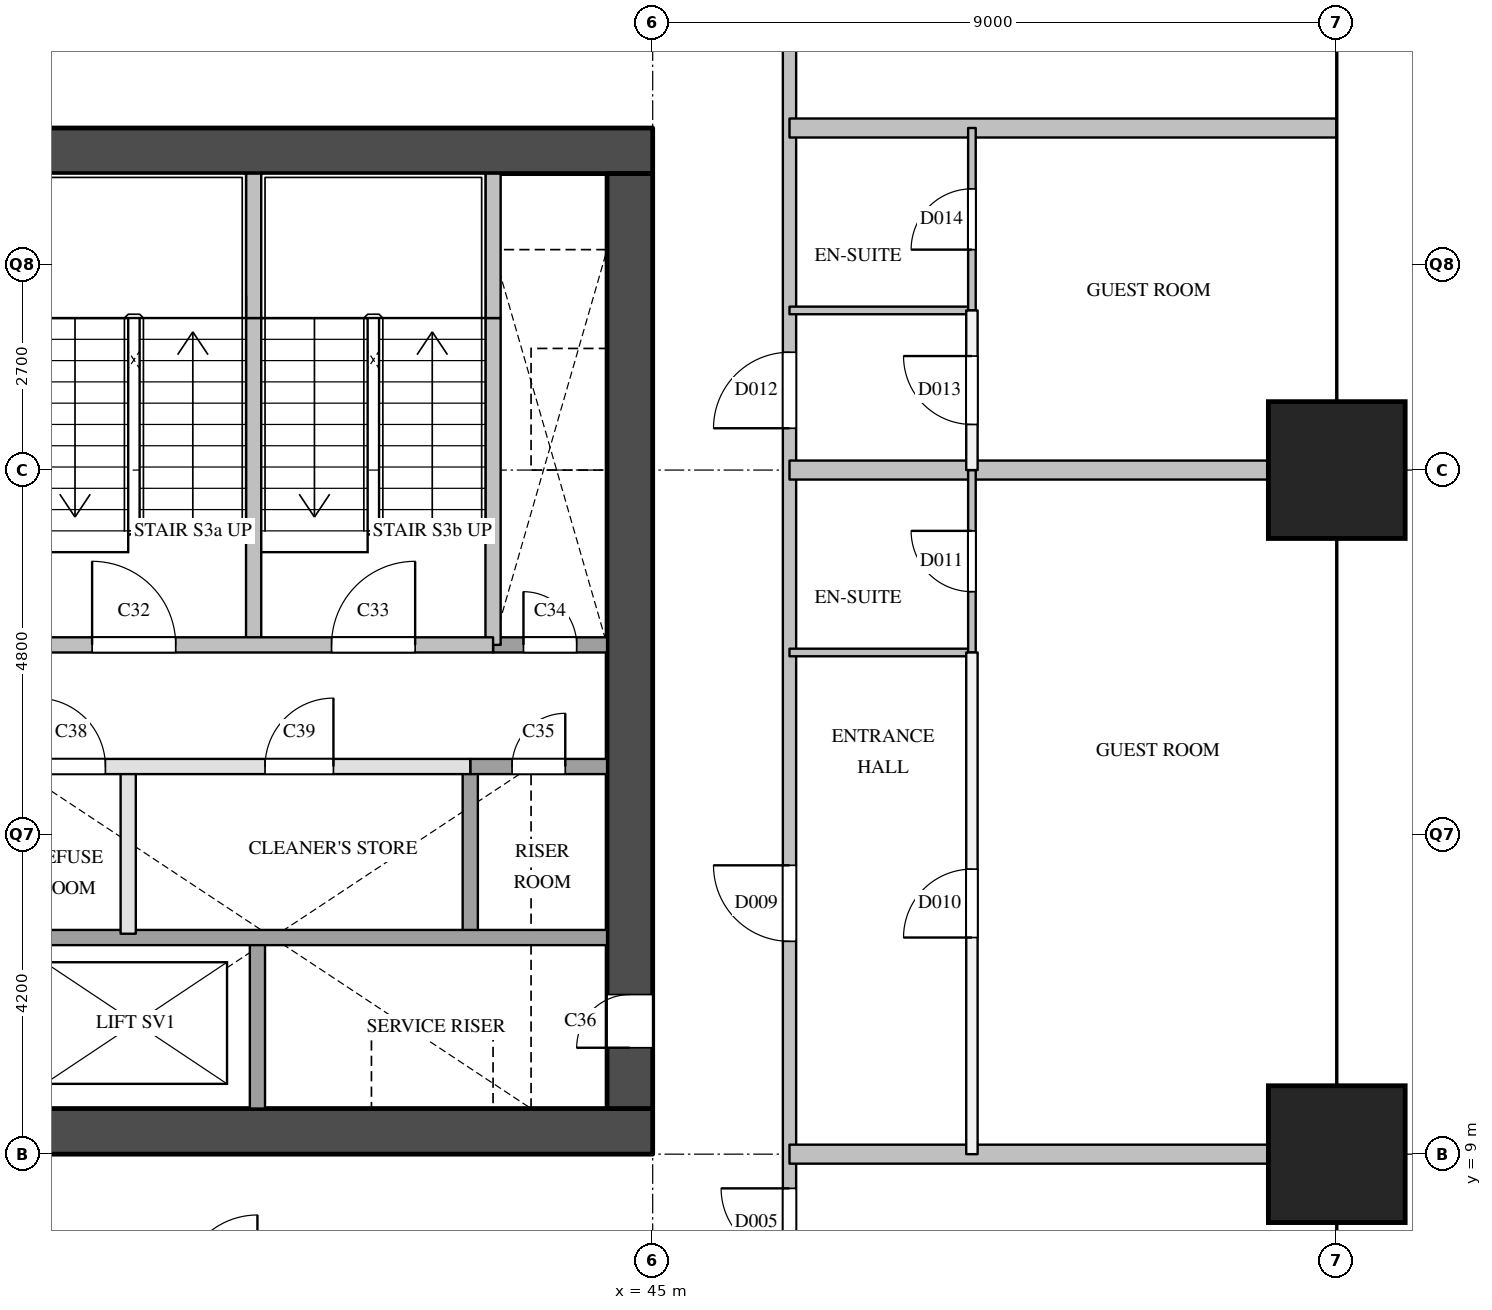
"""IFC4 building model, lengths in metres.
Left out: names, types, materials, properties, quantities, classifications, styles, units other than length and angle.
Written with IfcOpenShell. Run it as: python <this file> out.ifc"""

import sys

from ifc_helpers import new_model, si_unit, direction, frame, frame_2d, origin, origin_2d, place, context, subcontext, project, spatial, rectangle, extrude, element, fill, save


model = new_model("IFC4")
c1 = context("Model", 3, precision=1e-05, world=origin(), true_north=direction((0.0, 1.0)))
c2 = subcontext(c1, "Body", "Model", "MODEL_VIEW")
j1 = project(units=[si_unit("LENGTHUNIT", "METRE"), si_unit("PLANEANGLEUNIT", "RADIAN")], contexts=[c1])
p1 = place(None, origin())
s1 = spatial("IfcSite", under=j1, at=p1, CompositionType="ELEMENT")
p2 = place(p1, origin())
s2 = spatial("IfcBuilding", under=s1, at=p2, CompositionType="ELEMENT")
p3 = place(p2, frame((0.0, 0.0, 96.8)))
s3 = spatial("IfcBuildingStorey", under=s2, at=p3, CompositionType="ELEMENT", Elevation=96.8)
for number, where, z_axis, x_axis in (
    (1, (54.0, 9.0, 0.0), (0.0, 0.0, 1.0), (1.0, 0.0, 0.0)),
    (2, (54.0, 18.0, 0.0), (0.0, 0.0, 1.0), (1.0, 0.0, 0.0)),
):
    element("IfcColumn", number, at=place(p3, frame(where, z_axis=z_axis, x_axis=x_axis)), inside=s3, PredefinedType="COLUMN", context=c2, shape_type="SweptSolid", body=[
        extrude(rectangle(XDim=1.8, YDim=1.8, at=origin_2d()), origin(), (0.0, 0.0, 1.0), 3.8),
    ])
for number, where, z_axis, x_axis in (
    (3, (36.0, 9.3, 0.0), (0.0, 0.0, 1.0), (1.0, 0.0, 0.0)),
    (4, (36.0, 22.2, 0.0), (0.0, 0.0, 1.0), (1.0, 0.0, 0.0)),
):
    element("IfcWall", number, at=place(p3, frame(where, z_axis=z_axis, x_axis=x_axis)), inside=s3, PredefinedType="SHEAR", context=c2, shape_type="SweptSolid", body=[
        extrude(rectangle(XDim=9.0, YDim=0.6, at=frame_2d((4.5, 0.0))), origin(), (0.0, 0.0, 1.0), 3.5),
    ])
p4 = place(p3, frame((44.7, 9.6, 0.0), z_axis=(0.0, 0.0, 1.0), x_axis=(0.0, 1.0, 0.0)))
e5 = element("IfcWall", 5, at=p4, inside=s3, PredefinedType="SHEAR", context=c2, shape_type="SweptSolid", body=[
    extrude(rectangle(XDim=12.3, YDim=0.6, at=frame_2d((6.15, 0.0))), origin(), (0.0, 0.0, 1.0), 3.5),
])
p5 = place(p4, frame((0.8, 0.0, 0.0)))
e6 = element("IfcOpeningElement", 6, at=p5, cuts=e5, PredefinedType="OPENING", context=c2, shape_type="SweptSolid", body=[
    extrude(rectangle(XDim=0.7, YDim=2.1, at=frame_2d((0.35, 1.05))), frame((0.0, 0.31, 0.0), z_axis=(0.0, -1.0, 0.0), x_axis=(1.0, 0.0, 0.0)), (0.0, 0.0, 1.0), 0.62),
])
p6 = place(p3, frame((38.1, 11.9, 0.0), z_axis=(0.0, 0.0, 1.0), x_axis=(0.0, 1.0, 0.0)))
e7 = element("IfcWall", 7, at=p6, inside=s3, PredefinedType="PARTITIONING", context=c2, shape_type="SweptSolid", body=[
    extrude(rectangle(XDim=2.2, YDim=0.2, at=frame_2d((1.1, 0.0))), origin(), (0.0, 0.0, 1.0), 3.5),
])
p7 = place(p3, frame((39.75, 15.7, 0.0), z_axis=(0.0, 0.0, 1.0), x_axis=(0.0, 1.0, 0.0)))
e8 = element("IfcWall", 8, at=p7, inside=s3, PredefinedType="SOLIDWALL", context=c2, shape_type="SweptSolid", body=[
    extrude(rectangle(XDim=4.3, YDim=0.2, at=frame_2d((2.15, 0.0))), origin(), (0.0, 0.0, 1.0), 3.5),
])
p8 = place(p3, frame((39.75, 20.0, 0.0), z_axis=(0.0, 0.0, 1.0), x_axis=(0.0, 1.0, 0.0)))
e9 = element("IfcWall", 9, at=p8, inside=s3, PredefinedType="SOLIDWALL", context=c2, shape_type="SweptSolid", body=[
    extrude(rectangle(XDim=1.9, YDim=0.2, at=frame_2d((0.95, 0.0))), origin(), (0.0, 0.0, 1.0), 3.5),
])
p9 = place(p3, frame((39.8, 9.6, 0.0), z_axis=(0.0, 0.0, 1.0), x_axis=(0.0, 1.0, 0.0)))
e10 = element("IfcWall", 10, at=p9, inside=s3, PredefinedType="SOLIDWALL", context=c2, shape_type="SweptSolid", body=[
    extrude(rectangle(XDim=2.3, YDim=0.2, at=frame_2d((1.15, 0.0))), origin(), (0.0, 0.0, 1.0), 3.5),
])
p10 = place(p3, frame((42.6, 11.9, 0.0), z_axis=(0.0, 0.0, 1.0), x_axis=(0.0, 1.0, 0.0)))
e11 = element("IfcWall", 11, at=p10, inside=s3, PredefinedType="SOLIDWALL", context=c2, shape_type="SweptSolid", body=[
    extrude(rectangle(XDim=2.2, YDim=0.2, at=frame_2d((1.1, 0.0))), origin(), (0.0, 0.0, 1.0), 3.5),
])
p11 = place(p3, frame((42.9, 15.7, 0.0), z_axis=(0.0, 0.0, 1.0), x_axis=(0.0, 1.0, 0.0)))
e12 = element("IfcWall", 12, at=p11, inside=s3, PredefinedType="SOLIDWALL", context=c2, shape_type="SweptSolid", body=[
    extrude(rectangle(XDim=4.3, YDim=0.2, at=frame_2d((2.15, 0.0))), origin(), (0.0, 0.0, 1.0), 3.5),
])
p12 = place(p3, frame((42.9, 20.0, 0.0), z_axis=(0.0, 0.0, 1.0), x_axis=(0.0, 1.0, 0.0)))
e13 = element("IfcWall", 13, at=p12, inside=s3, PredefinedType="SOLIDWALL", context=c2, shape_type="SweptSolid", body=[
    extrude(rectangle(XDim=1.9, YDim=0.2, at=frame_2d((0.95, 0.0))), origin(), (0.0, 0.0, 1.0), 3.5),
])
p13 = place(p3, frame((36.6, 11.85, 0.0), z_axis=(0.0, 0.0, 1.0), x_axis=(1.0, 0.0, 0.0)))
e14 = element("IfcWall", 14, at=p13, inside=s3, PredefinedType="SOLIDWALL", context=c2, shape_type="SweptSolid", body=[
    extrude(rectangle(XDim=7.8, YDim=0.2, at=frame_2d((3.9, 0.0))), origin(), (0.0, 0.0, 1.0), 3.5),
])
p14 = place(p3, frame((36.6, 14.1, 0.0), z_axis=(0.0, 0.0, 1.0), x_axis=(1.0, 0.0, 0.0)))
e15 = element("IfcWall", 15, at=p14, inside=s3, PredefinedType="PARTITIONING", context=c2, shape_type="SweptSolid", body=[
    extrude(rectangle(XDim=6.0, YDim=0.2, at=frame_2d((3.0, 0.0))), origin(), (0.0, 0.0, 1.0), 3.5),
])
p15 = place(p14, frame((0.3, 0.0, 0.0)))
e16 = element("IfcOpeningElement", 16, at=p15, cuts=e15, PredefinedType="OPENING", context=c2, shape_type="SweptSolid", body=[
    extrude(rectangle(XDim=0.9, YDim=2.1, at=frame_2d((0.45, 1.05))), frame((0.0, 0.11, 0.0), z_axis=(0.0, -1.0, 0.0), x_axis=(1.0, 0.0, 0.0)), (0.0, 0.0, 1.0), 0.22),
])
p16 = place(p14, frame((3.3, 0.0, 0.0)))
e17 = element("IfcOpeningElement", 17, at=p16, cuts=e15, PredefinedType="OPENING", context=c2, shape_type="SweptSolid", body=[
    extrude(rectangle(XDim=0.9, YDim=2.1, at=frame_2d((0.45, 1.05))), frame((0.0, 0.11, 0.0), z_axis=(0.0, -1.0, 0.0), x_axis=(1.0, 0.0, 0.0)), (0.0, 0.0, 1.0), 0.22),
])
p17 = place(p3, frame((42.6, 14.1, 0.0), z_axis=(0.0, 0.0, 1.0), x_axis=(1.0, 0.0, 0.0)))
e18 = element("IfcWall", 18, at=p17, inside=s3, PredefinedType="SOLIDWALL", context=c2, shape_type="SweptSolid", body=[
    extrude(rectangle(XDim=1.8, YDim=0.2, at=frame_2d((0.9, 0.0))), origin(), (0.0, 0.0, 1.0), 3.5),
])
p18 = place(p17, frame((0.55, 0.0, 0.0)))
e19 = element("IfcOpeningElement", 19, at=p18, cuts=e18, PredefinedType="OPENING", context=c2, shape_type="SweptSolid", body=[
    extrude(rectangle(XDim=0.7, YDim=2.1, at=frame_2d((0.35, 1.05))), frame((0.0, 0.11, 0.0), z_axis=(0.0, -1.0, 0.0), x_axis=(1.0, 0.0, 0.0)), (0.0, 0.0, 1.0), 0.22),
])
p19 = place(p3, frame((42.9, 15.7, 0.0), z_axis=(0.0, 0.0, 1.0), x_axis=(1.0, 0.0, 0.0)))
e20 = element("IfcWall", 20, at=p19, inside=s3, PredefinedType="SOLIDWALL", context=c2, shape_type="SweptSolid", body=[
    extrude(rectangle(XDim=1.5, YDim=0.2, at=frame_2d((0.75, 0.0))), origin(), (0.0, 0.0, 1.0), 3.5),
])
p20 = place(p19, frame((0.4, 0.0, 0.0)))
e21 = element("IfcOpeningElement", 21, at=p20, cuts=e20, PredefinedType="OPENING", context=c2, shape_type="SweptSolid", body=[
    extrude(rectangle(XDim=0.7, YDim=2.1, at=frame_2d((0.35, 1.05))), frame((0.0, 0.11, 0.0), z_axis=(0.0, -1.0, 0.0), x_axis=(1.0, 0.0, 0.0)), (0.0, 0.0, 1.0), 0.22),
])
p21 = place(p3, frame((36.6, 15.7, 0.0), z_axis=(0.0, 0.0, 1.0), x_axis=(1.0, 0.0, 0.0)))
e22 = element("IfcWall", 22, at=p21, inside=s3, PredefinedType="SOLIDWALL", context=c2, shape_type="SweptSolid", body=[
    extrude(rectangle(XDim=6.3, YDim=0.2, at=frame_2d((3.15, 0.0))), origin(), (0.0, 0.0, 1.0), 3.5),
])
p22 = place(p21, frame((1.025, 0.0, 0.0)))
e23 = element("IfcOpeningElement", 23, at=p22, cuts=e22, PredefinedType="OPENING", context=c2, shape_type="SweptSolid", body=[
    extrude(rectangle(XDim=1.1, YDim=2.1, at=frame_2d((0.55, 1.05))), frame((0.0, 0.11, 0.0), z_axis=(0.0, -1.0, 0.0), x_axis=(1.0, 0.0, 0.0)), (0.0, 0.0, 1.0), 0.22),
])
p23 = place(p21, frame((4.175, 0.0, 0.0)))
e24 = element("IfcOpeningElement", 24, at=p23, cuts=e22, PredefinedType="OPENING", context=c2, shape_type="SweptSolid", body=[
    extrude(rectangle(XDim=1.1, YDim=2.1, at=frame_2d((0.55, 1.05))), frame((0.0, 0.11, 0.0), z_axis=(0.0, -1.0, 0.0), x_axis=(1.0, 0.0, 0.0)), (0.0, 0.0, 1.0), 0.22),
])
p24 = place(p3, frame((46.8, 7.2, 0.0), z_axis=(0.0, 0.0, 1.0), x_axis=(0.0, 1.0, 0.0)))
e25 = element("IfcWall", 25, at=p24, inside=s3, PredefinedType="PARTITIONING", context=c2, shape_type="SweptSolid", body=[
    extrude(rectangle(XDim=16.49, YDim=0.175, at=frame_2d((8.245, 0.0))), origin(), (0.0, 0.0, 1.0), 3.5),
])
p25 = place(p24, frame((0.45, 0.0, 0.0)))
e26 = element("IfcOpeningElement", 26, at=p25, cuts=e25, PredefinedType="OPENING", context=c2, shape_type="SweptSolid", body=[
    extrude(rectangle(XDim=0.9, YDim=2.1, at=frame_2d((0.45, 1.05))), frame((0.0, 0.097, 0.0), z_axis=(0.0, -1.0, 0.0), x_axis=(1.0, 0.0, 0.0)), (0.0, 0.0, 1.0), 0.195),
])
p26 = place(p24, frame((4.6, 0.0, 0.0)))
e27 = element("IfcOpeningElement", 27, at=p26, cuts=e25, PredefinedType="OPENING", context=c2, shape_type="SweptSolid", body=[
    extrude(rectangle(XDim=1.0, YDim=2.1, at=frame_2d((0.5, 1.05))), frame((0.0, 0.097, 0.0), z_axis=(0.0, -1.0, 0.0), x_axis=(1.0, 0.0, 0.0)), (0.0, 0.0, 1.0), 0.195),
])
p27 = place(p24, frame((11.35, 0.0, 0.0)))
e28 = element("IfcOpeningElement", 28, at=p27, cuts=e25, PredefinedType="OPENING", context=c2, shape_type="SweptSolid", body=[
    extrude(rectangle(XDim=1.0, YDim=2.1, at=frame_2d((0.5, 1.05))), frame((0.0, 0.097, 0.0), z_axis=(0.0, -1.0, 0.0), x_axis=(1.0, 0.0, 0.0)), (0.0, 0.0, 1.0), 0.195),
])
p28 = place(p3, frame((49.2, 9.0, 0.0), z_axis=(0.0, 0.0, 1.0), x_axis=(0.0, 1.0, 0.0)))
e29 = element("IfcWall", 29, at=p28, inside=s3, PredefinedType="PARTITIONING", context=c2, shape_type="SweptSolid", body=[
    extrude(rectangle(XDim=6.6, YDim=0.15, at=frame_2d((3.3, 0.0))), origin(), (0.0, 0.0, 1.0), 3.5),
])
p29 = place(p28, frame((2.85, 0.0, 0.0)))
e30 = element("IfcOpeningElement", 30, at=p29, cuts=e29, PredefinedType="OPENING", context=c2, shape_type="SweptSolid", body=[
    extrude(rectangle(XDim=0.9, YDim=2.1, at=frame_2d((0.45, 1.05))), frame((0.0, 0.085, 0.0), z_axis=(0.0, -1.0, 0.0), x_axis=(1.0, 0.0, 0.0)), (0.0, 0.0, 1.0), 0.17),
])
p30 = place(p3, frame((49.2, 18.0, 0.0), z_axis=(0.0, 0.0, 1.0), x_axis=(0.0, 1.0, 0.0)))
e31 = element("IfcWall", 31, at=p30, inside=s3, PredefinedType="PARTITIONING", context=c2, shape_type="SweptSolid", body=[
    extrude(rectangle(XDim=2.1, YDim=0.15, at=frame_2d((1.05, 0.0))), origin(), (0.0, 0.0, 1.0), 3.5),
])
p31 = place(p30, frame((0.6, 0.0, 0.0)))
e32 = element("IfcOpeningElement", 32, at=p31, cuts=e31, PredefinedType="OPENING", context=c2, shape_type="SweptSolid", body=[
    extrude(rectangle(XDim=0.9, YDim=2.1, at=frame_2d((0.45, 1.05))), frame((0.0, 0.085, 0.0), z_axis=(0.0, -1.0, 0.0), x_axis=(1.0, 0.0, 0.0)), (0.0, 0.0, 1.0), 0.17),
])
for number, where, z_axis, x_axis in (
    (33, (46.8, 9.0, 0.0), (0.0, 0.0, 1.0), (1.0, 0.0, 0.0)),
    (34, (46.8, 18.0, 0.0), (0.0, 0.0, 1.0), (1.0, 0.0, 0.0)),
):
    element("IfcWall", number, at=place(p3, frame(where, z_axis=z_axis, x_axis=x_axis)), inside=s3, PredefinedType="PARTITIONING", context=c2, shape_type="SweptSolid", body=[
        extrude(rectangle(XDim=7.2, YDim=0.25, at=frame_2d((3.6, 0.0))), origin(), (0.0, 0.0, 1.0), 3.5),
    ])
p32 = place(p3, frame((46.8, 22.5, 0.0), z_axis=(0.0, 0.0, 1.0), x_axis=(1.0, 0.0, 0.0)))
e35 = element("IfcWall", 35, at=p32, inside=s3, PredefinedType="PARTITIONING", context=c2, shape_type="SweptSolid", body=[
    extrude(rectangle(XDim=7.2, YDim=0.25, at=frame_2d((3.6, 0.0))), origin(), (0.0, 0.0, 1.0), 2.5),
])
for number, where, z_axis, x_axis in (
    (36, (46.8, 15.6, 0.0), (0.0, 0.0, 1.0), (1.0, 0.0, 0.0)),
    (37, (46.8, 20.1, 0.0), (0.0, 0.0, 1.0), (1.0, 0.0, 0.0)),
):
    element("IfcWall", number, at=place(p3, frame(where, z_axis=z_axis, x_axis=x_axis)), inside=s3, PredefinedType="PARTITIONING", context=c2, shape_type="SweptSolid", body=[
        extrude(rectangle(XDim=2.4, YDim=0.1, at=frame_2d((1.2, 0.0))), origin(), (0.0, 0.0, 1.0), 3.5),
    ])
p33 = place(p3, frame((49.2, 15.6, 0.0), z_axis=(0.0, 0.0, 1.0), x_axis=(0.0, 1.0, 0.0)))
e38 = element("IfcWall", 38, at=p33, inside=s3, PredefinedType="PARTITIONING", context=c2, shape_type="SweptSolid", body=[
    extrude(rectangle(XDim=2.4, YDim=0.1, at=frame_2d((1.2, 0.0))), origin(), (0.0, 0.0, 1.0), 3.5),
])
p34 = place(p33, frame((0.8, 0.0, 0.0)))
e39 = element("IfcOpeningElement", 39, at=p34, cuts=e38, PredefinedType="OPENING", context=c2, shape_type="SweptSolid", body=[
    extrude(rectangle(XDim=0.8, YDim=2.1, at=frame_2d((0.4, 1.05))), frame((0.0, 0.06, 0.0), z_axis=(0.0, -1.0, 0.0), x_axis=(1.0, 0.0, 0.0)), (0.0, 0.0, 1.0), 0.12),
])
p35 = place(p3, frame((49.2, 20.1, 0.0), z_axis=(0.0, 0.0, 1.0), x_axis=(0.0, 1.0, 0.0)))
e40 = element("IfcWall", 40, at=p35, inside=s3, PredefinedType="PARTITIONING", context=c2, shape_type="SweptSolid", body=[
    extrude(rectangle(XDim=2.4, YDim=0.1, at=frame_2d((1.2, 0.0))), origin(), (0.0, 0.0, 1.0), 3.5),
])
p36 = place(p35, frame((0.8, 0.0, 0.0)))
e41 = element("IfcOpeningElement", 41, at=p36, cuts=e40, PredefinedType="OPENING", context=c2, shape_type="SweptSolid", body=[
    extrude(rectangle(XDim=0.8, YDim=2.1, at=frame_2d((0.4, 1.05))), frame((0.0, 0.06, 0.0), z_axis=(0.0, -1.0, 0.0), x_axis=(1.0, 0.0, 0.0)), (0.0, 0.0, 1.0), 0.12),
])
p37 = place(p22, origin())
e42 = element("IfcDoor", 42, at=p37, inside=s3, OperationType="SINGLE_SWING_LEFT", PredefinedType="DOOR", context=c2, shape_type="SweptSolid", body=[
    extrude(rectangle(XDim=1.1, YDim=2.1, at=frame_2d((0.55, 1.05))), frame((0.0, 0.025, 0.0), z_axis=(0.0, -1.0, 0.0), x_axis=(1.0, 0.0, 0.0)), (0.0, 0.0, 1.0), 0.05),
])
fill(e23, e42)
p38 = place(p23, origin())
e43 = element("IfcDoor", 43, at=p38, inside=s3, OperationType="SINGLE_SWING_RIGHT", PredefinedType="DOOR", context=c2, shape_type="SweptSolid", body=[
    extrude(rectangle(XDim=1.1, YDim=2.1, at=frame_2d((0.55, 1.05))), frame((0.0, 0.025, 0.0), z_axis=(0.0, -1.0, 0.0), x_axis=(1.0, 0.0, 0.0)), (0.0, 0.0, 1.0), 0.05),
])
fill(e24, e43)
p39 = place(p20, origin())
e44 = element("IfcDoor", 44, at=p39, inside=s3, OperationType="SINGLE_SWING_LEFT", PredefinedType="DOOR", context=c2, shape_type="SweptSolid", body=[
    extrude(rectangle(XDim=0.7, YDim=2.1, at=frame_2d((0.35, 1.05))), frame((0.0, 0.025, 0.0), z_axis=(0.0, -1.0, 0.0), x_axis=(1.0, 0.0, 0.0)), (0.0, 0.0, 1.0), 0.05),
])
fill(e21, e44)
p40 = place(p18, origin())
e45 = element("IfcDoor", 45, at=p40, inside=s3, OperationType="SINGLE_SWING_RIGHT", PredefinedType="DOOR", context=c2, shape_type="SweptSolid", body=[
    extrude(rectangle(XDim=0.7, YDim=2.1, at=frame_2d((0.35, 1.05))), frame((0.0, 0.025, 0.0), z_axis=(0.0, -1.0, 0.0), x_axis=(1.0, 0.0, 0.0)), (0.0, 0.0, 1.0), 0.05),
])
fill(e19, e45)
p41 = place(p5, origin())
e46 = element("IfcDoor", 46, at=p41, inside=s3, OperationType="SINGLE_SWING_LEFT", PredefinedType="DOOR", context=c2, shape_type="SweptSolid", body=[
    extrude(rectangle(XDim=0.7, YDim=2.1, at=frame_2d((0.35, 1.05))), frame((0.0, 0.025, 0.0), z_axis=(0.0, -1.0, 0.0), x_axis=(1.0, 0.0, 0.0)), (0.0, 0.0, 1.0), 0.05),
])
fill(e6, e46)
p42 = place(p15, origin())
e47 = element("IfcDoor", 47, at=p42, inside=s3, OperationType="SINGLE_SWING_LEFT", PredefinedType="DOOR", context=c2, shape_type="SweptSolid", body=[
    extrude(rectangle(XDim=0.9, YDim=2.1, at=frame_2d((0.45, 1.05))), frame((0.0, 0.025, 0.0), z_axis=(0.0, -1.0, 0.0), x_axis=(1.0, 0.0, 0.0)), (0.0, 0.0, 1.0), 0.05),
])
fill(e16, e47)
p43 = place(p16, origin())
e48 = element("IfcDoor", 48, at=p43, inside=s3, OperationType="SINGLE_SWING_RIGHT", PredefinedType="DOOR", context=c2, shape_type="SweptSolid", body=[
    extrude(rectangle(XDim=0.9, YDim=2.1, at=frame_2d((0.45, 1.05))), frame((0.0, 0.025, 0.0), z_axis=(0.0, -1.0, 0.0), x_axis=(1.0, 0.0, 0.0)), (0.0, 0.0, 1.0), 0.05),
])
fill(e17, e48)
p44 = place(p25, origin())
e49 = element("IfcDoor", 49, at=p44, inside=s3, OperationType="SINGLE_SWING_RIGHT", PredefinedType="DOOR", context=c2, shape_type="SweptSolid", body=[
    extrude(rectangle(XDim=0.9, YDim=2.1, at=frame_2d((0.45, 1.05))), frame((0.0, 0.025, 0.0), z_axis=(0.0, -1.0, 0.0), x_axis=(1.0, 0.0, 0.0)), (0.0, 0.0, 1.0), 0.05),
])
fill(e26, e49)
p45 = place(p26, origin())
e50 = element("IfcDoor", 50, at=p45, inside=s3, OperationType="SINGLE_SWING_RIGHT", PredefinedType="DOOR", context=c2, shape_type="SweptSolid", body=[
    extrude(rectangle(XDim=1.0, YDim=2.1, at=frame_2d((0.5, 1.05))), frame((0.0, 0.025, 0.0), z_axis=(0.0, -1.0, 0.0), x_axis=(1.0, 0.0, 0.0)), (0.0, 0.0, 1.0), 0.05),
])
fill(e27, e50)
p46 = place(p29, origin())
e51 = element("IfcDoor", 51, at=p46, inside=s3, OperationType="SINGLE_SWING_LEFT", PredefinedType="DOOR", context=c2, shape_type="SweptSolid", body=[
    extrude(rectangle(XDim=0.9, YDim=2.1, at=frame_2d((0.45, 1.05))), frame((0.0, 0.025, 0.0), z_axis=(0.0, -1.0, 0.0), x_axis=(1.0, 0.0, 0.0)), (0.0, 0.0, 1.0), 0.05),
])
fill(e30, e51)
p47 = place(p34, origin())
e52 = element("IfcDoor", 52, at=p47, inside=s3, OperationType="SINGLE_SWING_RIGHT", PredefinedType="DOOR", context=c2, shape_type="SweptSolid", body=[
    extrude(rectangle(XDim=0.8, YDim=2.1, at=frame_2d((0.4, 1.05))), frame((0.0, 0.025, 0.0), z_axis=(0.0, -1.0, 0.0), x_axis=(1.0, 0.0, 0.0)), (0.0, 0.0, 1.0), 0.05),
])
fill(e39, e52)
p48 = place(p27, origin())
e53 = element("IfcDoor", 53, at=p48, inside=s3, OperationType="SINGLE_SWING_LEFT", PredefinedType="DOOR", context=c2, shape_type="SweptSolid", body=[
    extrude(rectangle(XDim=1.0, YDim=2.1, at=frame_2d((0.5, 1.05))), frame((0.0, 0.025, 0.0), z_axis=(0.0, -1.0, 0.0), x_axis=(1.0, 0.0, 0.0)), (0.0, 0.0, 1.0), 0.05),
])
fill(e28, e53)
p49 = place(p31, origin())
e54 = element("IfcDoor", 54, at=p49, inside=s3, OperationType="SINGLE_SWING_RIGHT", PredefinedType="DOOR", context=c2, shape_type="SweptSolid", body=[
    extrude(rectangle(XDim=0.9, YDim=2.1, at=frame_2d((0.45, 1.05))), frame((0.0, 0.025, 0.0), z_axis=(0.0, -1.0, 0.0), x_axis=(1.0, 0.0, 0.0)), (0.0, 0.0, 1.0), 0.05),
])
fill(e32, e54)
p50 = place(p36, origin())
e55 = element("IfcDoor", 55, at=p50, inside=s3, OperationType="SINGLE_SWING_LEFT", PredefinedType="DOOR", context=c2, shape_type="SweptSolid", body=[
    extrude(rectangle(XDim=0.8, YDim=2.1, at=frame_2d((0.4, 1.05))), frame((0.0, 0.025, 0.0), z_axis=(0.0, -1.0, 0.0), x_axis=(1.0, 0.0, 0.0)), (0.0, 0.0, 1.0), 0.05),
])
fill(e41, e55)
save(model, sys.argv[1])
